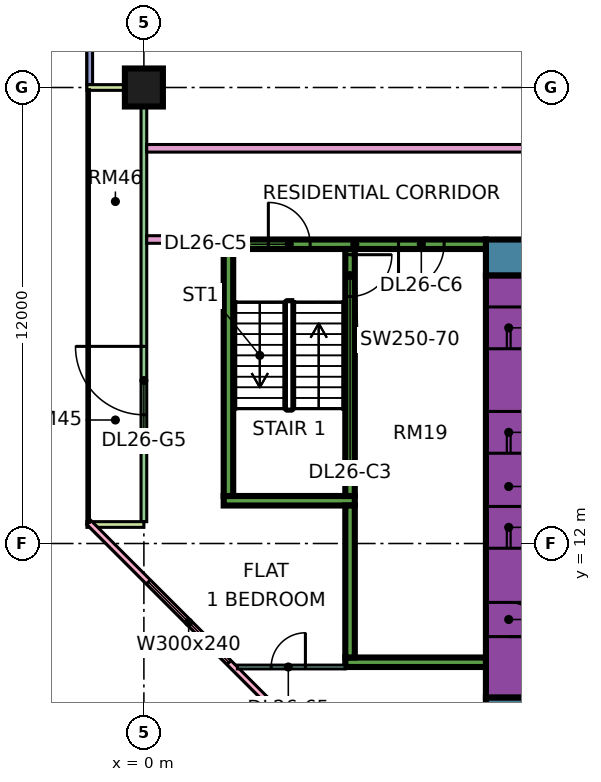
"""IFC4 building model, lengths in metres.
Left out: names, types, materials, properties, quantities, classifications, styles, units other than length and angle.
Written with IfcOpenShell. Run it as: python <this file> out.ifc"""

import sys

from ifc_helpers import new_model, si_unit, direction, frame, frame_2d, origin, origin_2d, place, context, subcontext, project, spatial, rectangle, extrude, element, fill, save


model = new_model("IFC4")
c1 = context("Model", 3, precision=1e-05, world=origin(), true_north=direction((0.0, 1.0)))
c2 = subcontext(c1, "Body", "Model", "MODEL_VIEW")
j1 = project(units=[si_unit("LENGTHUNIT", "METRE"), si_unit("PLANEANGLEUNIT", "RADIAN")], contexts=[c1])
p1 = place(None, origin())
s1 = spatial("IfcSite", under=j1, at=p1, CompositionType="ELEMENT")
p2 = place(p1, origin())
s2 = spatial("IfcBuilding", under=s1, at=p2, CompositionType="ELEMENT")
p3 = place(p2, frame((0.0, 0.0, 114.4)))
s3 = spatial("IfcBuildingStorey", under=s2, at=p3, CompositionType="ELEMENT", Elevation=114.4)
p4 = place(p3, frame((0.0, 24.0, 0.0), z_axis=(0.0, 0.0, 1.0), x_axis=(1.0, 0.0, 0.0)))
e1 = element("IfcColumn", 1, at=p4, inside=s3, PredefinedType="COLUMN", context=c2, shape_type="SweptSolid", body=[
    extrude(rectangle(XDim=1.0, YDim=1.0, at=origin_2d()), origin(), (0.0, 0.0, 1.0), 3.75),
])
p5 = place(p3, frame((9.0, 7.475, 0.0), z_axis=(0.0, 0.0, 1.0), x_axis=(1.0, 0.0, 0.0)))
e2 = element("IfcWall", 2, at=p5, inside=s3, PredefinedType="SHEAR", context=c2, shape_type="SweptSolid", body=[
    extrude(rectangle(XDim=25.0, YDim=0.95, at=frame_2d((12.5, 0.0))), origin(), (0.0, 0.0, 1.0), 3.75),
])
p6 = place(p3, frame((9.0, 19.525, 0.0), z_axis=(0.0, 0.0, 1.0), x_axis=(1.0, 0.0, 0.0)))
e3 = element("IfcWall", 3, at=p6, inside=s3, PredefinedType="SHEAR", context=c2, shape_type="SweptSolid", body=[
    extrude(rectangle(XDim=25.0, YDim=0.95, at=frame_2d((12.5, 0.0))), origin(), (0.0, 0.0, 1.0), 3.75),
])
p7 = place(p6, frame((19.1, 0.0, 0.0)))
e4 = element("IfcOpeningElement", 4, at=p7, cuts=e3, PredefinedType="OPENING", context=c2, shape_type="SweptSolid", body=[
    extrude(rectangle(XDim=1.8, YDim=2.4, at=frame_2d((0.9, 1.2))), frame((0.0, 0.485, 0.0), z_axis=(0.0, -1.0, 0.0), x_axis=(1.0, 0.0, 0.0)), (0.0, 0.0, 1.0), 0.97),
])
p8 = place(p3, frame((9.6, 7.95, 0.0), z_axis=(0.0, 0.0, 1.0), x_axis=(0.0, 1.0, 0.0)))
e5 = element("IfcWall", 5, at=p8, inside=s3, PredefinedType="SHEAR", context=c2, shape_type="SweptSolid", body=[
    extrude(rectangle(XDim=11.1, YDim=1.2, at=frame_2d((5.55, 0.0))), origin(), (0.0, 0.0, 1.0), 3.75),
])
p9 = place(p8, frame((3.925, 0.0, 0.0)))
e6 = element("IfcOpeningElement", 6, at=p9, cuts=e5, PredefinedType="OPENING", context=c2, shape_type="SweptSolid", body=[
    extrude(rectangle(XDim=1.1, YDim=2.2, at=frame_2d((0.55, 1.1))), frame((0.0, 0.61, 0.0), z_axis=(0.0, -1.0, 0.0), x_axis=(1.0, 0.0, 0.0)), (0.0, 0.0, 1.0), 1.22),
])
p10 = place(p8, frame((6.425, 0.0, 0.0)))
e7 = element("IfcOpeningElement", 7, at=p10, cuts=e5, PredefinedType="OPENING", context=c2, shape_type="SweptSolid", body=[
    extrude(rectangle(XDim=1.1, YDim=2.2, at=frame_2d((0.55, 1.1))), frame((0.0, 0.61, 0.0), z_axis=(0.0, -1.0, 0.0), x_axis=(1.0, 0.0, 0.0)), (0.0, 0.0, 1.0), 1.22),
])
p11 = place(p8, frame((9.175, 0.0, 0.0)))
e8 = element("IfcOpeningElement", 8, at=p11, cuts=e5, PredefinedType="OPENING", context=c2, shape_type="SweptSolid", body=[
    extrude(rectangle(XDim=1.1, YDim=2.2, at=frame_2d((0.55, 1.1))), frame((0.0, 0.61, 0.0), z_axis=(0.0, -1.0, 0.0), x_axis=(1.0, 0.0, 0.0)), (0.0, 0.0, 1.0), 1.22),
])
p12 = place(p8, frame((1.6, 0.0, 0.0)))
e9 = element("IfcOpeningElement", 9, at=p12, cuts=e5, PredefinedType="OPENING", context=c2, shape_type="SweptSolid", body=[
    extrude(rectangle(XDim=0.9, YDim=2.1, at=frame_2d((0.45, 1.05))), frame((0.0, 0.61, 0.0), z_axis=(0.0, -1.0, 0.0), x_axis=(1.0, 0.0, 0.0)), (0.0, 0.0, 1.0), 1.22),
])
p13 = place(p3, frame((2.1, 19.875, 0.0), z_axis=(0.0, 0.0, 1.0), x_axis=(1.0, 0.0, 0.0)))
e10 = element("IfcWall", 10, at=p13, inside=s3, PredefinedType="SHEAR", context=c2, shape_type="SweptSolid", body=[
    extrude(rectangle(XDim=6.9, YDim=0.25, at=frame_2d((3.45, 0.0))), origin(), (0.0, 0.0, 1.0), 3.75),
])
p14 = place(p13, frame((1.175, 0.0, 0.0)))
e11 = element("IfcOpeningElement", 11, at=p14, cuts=e10, PredefinedType="OPENING", context=c2, shape_type="SweptSolid", body=[
    extrude(rectangle(XDim=1.1, YDim=2.2, at=frame_2d((0.55, 1.1))), frame((0.0, 0.135, 0.0), z_axis=(0.0, -1.0, 0.0), x_axis=(1.0, 0.0, 0.0)), (0.0, 0.0, 1.0), 0.27),
])
p15 = place(p13, frame((4.6, 0.0, 0.0)))
e12 = element("IfcOpeningElement", 12, at=p15, cuts=e10, PredefinedType="OPENING", context=c2, shape_type="SweptSolid", body=[
    extrude(rectangle(XDim=1.2, YDim=2.2, at=frame_2d((0.6, 1.1))), frame((0.0, 0.135, 0.0), z_axis=(0.0, -1.0, 0.0), x_axis=(1.0, 0.0, 0.0)), (0.0, 0.0, 1.0), 0.27),
])
p16 = place(p3, frame((2.1, 13.125, 0.0), z_axis=(0.0, 0.0, 1.0), x_axis=(1.0, 0.0, 0.0)))
e13 = element("IfcWall", 13, at=p16, inside=s3, PredefinedType="SHEAR", context=c2, shape_type="SweptSolid", body=[
    extrude(rectangle(XDim=3.45, YDim=0.25, at=frame_2d((1.725, 0.0))), origin(), (0.0, 0.0, 1.0), 3.75),
])
p17 = place(p3, frame((2.225, 13.25, 0.0), z_axis=(0.0, 0.0, 1.0), x_axis=(0.0, 1.0, 0.0)))
e14 = element("IfcWall", 14, at=p17, inside=s3, PredefinedType="SHEAR", context=c2, shape_type="SweptSolid", body=[
    extrude(rectangle(XDim=6.5, YDim=0.25, at=frame_2d((3.25, 0.0))), origin(), (0.0, 0.0, 1.0), 3.75),
])
p18 = place(p3, frame((5.425, 13.25, 0.0), z_axis=(0.0, 0.0, 1.0), x_axis=(0.0, 1.0, 0.0)))
e15 = element("IfcWall", 15, at=p18, inside=s3, PredefinedType="SHEAR", context=c2, shape_type="SweptSolid", body=[
    extrude(rectangle(XDim=6.5, YDim=0.25, at=frame_2d((3.25, 0.0))), origin(), (0.0, 0.0, 1.0), 3.75),
])
p19 = place(p18, frame((5.25, 0.0, 0.0)))
e16 = element("IfcOpeningElement", 16, at=p19, cuts=e15, PredefinedType="OPENING", context=c2, shape_type="SweptSolid", body=[
    extrude(rectangle(XDim=1.1, YDim=2.2, at=frame_2d((0.55, 1.1))), frame((0.0, 0.135, 0.0), z_axis=(0.0, -1.0, 0.0), x_axis=(1.0, 0.0, 0.0)), (0.0, 0.0, 1.0), 0.27),
])
p20 = place(p3, frame((5.3, 8.875, 0.0), z_axis=(0.0, 0.0, 1.0), x_axis=(1.0, 0.0, 0.0)))
e17 = element("IfcWall", 17, at=p20, inside=s3, PredefinedType="SHEAR", context=c2, shape_type="SweptSolid", body=[
    extrude(rectangle(XDim=3.7, YDim=0.25, at=frame_2d((1.85, 0.0))), origin(), (0.0, 0.0, 1.0), 3.75),
])
p21 = place(p3, frame((5.425, 9.0, 0.0), z_axis=(0.0, 0.0, 1.0), x_axis=(0.0, 1.0, 0.0)))
e18 = element("IfcWall", 18, at=p21, inside=s3, PredefinedType="SHEAR", context=c2, shape_type="SweptSolid", body=[
    extrude(rectangle(XDim=4.0, YDim=0.25, at=frame_2d((2.0, 0.0))), origin(), (0.0, 0.0, 1.0), 3.75),
])
p22 = place(p3, frame((-1.425, 35.925, 0.0), z_axis=(0.0, 0.0, 1.0), x_axis=(0.0, -1.0, 0.0)))
e19 = element("IfcWall", 19, at=p22, inside=s3, PredefinedType="SOLIDWALL", context=c2, shape_type="SweptSolid", body=[
    extrude(rectangle(XDim=11.85, YDim=0.15, at=frame_2d((5.925, 0.0))), origin(), (0.0, 0.0, 1.0), 3.35),
])
p23 = place(p22, frame((0.562, 0.0, 0.45)))
e20 = element("IfcOpeningElement", 20, at=p23, cuts=e19, PredefinedType="OPENING", context=c2, shape_type="SweptSolid", body=[
    extrude(rectangle(XDim=1.8, YDim=2.4, at=frame_2d((0.9, 1.2))), frame((0.0, 0.085, 0.0), z_axis=(0.0, -1.0, 0.0), x_axis=(1.0, 0.0, 0.0)), (0.0, 0.0, 1.0), 0.17),
])
p24 = place(p22, frame((3.525, 0.0, 0.45)))
e21 = element("IfcOpeningElement", 21, at=p24, cuts=e19, PredefinedType="OPENING", context=c2, shape_type="SweptSolid", body=[
    extrude(rectangle(XDim=1.8, YDim=2.4, at=frame_2d((0.9, 1.2))), frame((0.0, 0.085, 0.0), z_axis=(0.0, -1.0, 0.0), x_axis=(1.0, 0.0, 0.0)), (0.0, 0.0, 1.0), 0.17),
])
p25 = place(p22, frame((7.387, 0.0, 0.45)))
e22 = element("IfcOpeningElement", 22, at=p25, cuts=e19, PredefinedType="OPENING", context=c2, shape_type="SweptSolid", body=[
    extrude(rectangle(XDim=3.0, YDim=2.4, at=frame_2d((1.5, 1.2))), frame((0.0, 0.085, 0.0), z_axis=(0.0, -1.0, 0.0), x_axis=(1.0, 0.0, 0.0)), (0.0, 0.0, 1.0), 0.17),
])
p26 = place(p3, frame((0.0, 23.925, 0.0), z_axis=(0.0, 0.0, 1.0), x_axis=(0.0, -1.0, 0.0)))
e23 = element("IfcWall", 23, at=p26, inside=s3, PredefinedType="SOLIDWALL", context=c2, shape_type="SweptSolid", body=[
    extrude(rectangle(XDim=11.35, YDim=0.15, at=frame_2d((5.675, 0.0))), origin(), (0.0, 0.0, 1.0), 3.35),
])
p27 = place(p26, frame((6.738, 0.0, 0.0)))
e24 = element("IfcOpeningElement", 24, at=p27, cuts=e23, PredefinedType="OPENING", context=c2, shape_type="SweptSolid", body=[
    extrude(rectangle(XDim=1.8, YDim=2.4, at=frame_2d((0.9, 1.2))), frame((0.0, 0.085, 0.0), z_axis=(0.0, -1.0, 0.0), x_axis=(1.0, 0.0, 0.0)), (0.0, 0.0, 1.0), 0.17),
])
for number, where, z_axis, x_axis in (
    (25, (-1.5, 24.0, 0.0), (0.0, 0.0, 1.0), (1.0, 0.0, 0.0)),
    (26, (-1.5, 12.5, 0.0), (0.0, 0.0, 1.0), (1.0, 0.0, 0.0)),
):
    element("IfcWall", number, at=place(p3, frame(where, z_axis=z_axis, x_axis=x_axis)), inside=s3, PredefinedType="SOLIDWALL", context=c2, shape_type="SweptSolid", body=[
        extrude(rectangle(XDim=1.5, YDim=0.15, at=frame_2d((0.75, 0.0))), origin(), (0.0, 0.0, 1.0), 3.35),
    ])
p28 = place(p3, frame((-1.447, 12.553, 0.0), z_axis=(0.0, 0.0, 1.0), x_axis=(0.707106781187, -0.707106781187, 0.0)))
e27 = element("IfcWall", 27, at=p28, inside=s3, PredefinedType="SOLIDWALL", context=c2, shape_type="SweptSolid", body=[
    extrude(rectangle(XDim=19.799, YDim=0.15, at=frame_2d((9.899, 0.0))), origin(), (0.0, 0.0, 1.0), 3.35),
])
p29 = place(p28, frame((2.212, 0.0, 0.45)))
e28 = element("IfcOpeningElement", 28, at=p29, cuts=e27, PredefinedType="OPENING", context=c2, shape_type="SweptSolid", body=[
    extrude(rectangle(XDim=3.0, YDim=2.4, at=frame_2d((1.5, 1.2))), frame((0.0, 0.085, 0.0), z_axis=(0.0, -1.0, 0.0), x_axis=(1.0, 0.0, 0.0)), (0.0, 0.0, 1.0), 0.17),
])
p30 = place(p28, frame((10.216, 0.0, 0.45)))
e29 = element("IfcOpeningElement", 29, at=p30, cuts=e27, PredefinedType="OPENING", context=c2, shape_type="SweptSolid", body=[
    extrude(rectangle(XDim=3.0, YDim=2.4, at=frame_2d((1.5, 1.2))), frame((0.0, 0.085, 0.0), z_axis=(0.0, -1.0, 0.0), x_axis=(1.0, 0.0, 0.0)), (0.0, 0.0, 1.0), 0.17),
])
p31 = place(p3, frame((0.074, 20.0, 0.0), z_axis=(0.0, 0.0, 1.0), x_axis=(1.0, 0.0, 0.0)))
e30 = element("IfcWall", 30, at=p31, inside=s3, PredefinedType="PARTITIONING", context=c2, shape_type="SweptSolid", body=[
    extrude(rectangle(XDim=2.026, YDim=0.2, at=frame_2d((1.013, 0.0))), origin(), (0.0, 0.0, 1.0), 3.35),
])
p32 = place(p3, frame((0.074, 22.4, 0.0), z_axis=(0.0, 0.0, 1.0), x_axis=(1.0, 0.0, 0.0)))
e31 = element("IfcWall", 31, at=p32, inside=s3, PredefinedType="PARTITIONING", context=c2, shape_type="SweptSolid", body=[
    extrude(rectangle(XDim=12.326, YDim=0.2, at=frame_2d((6.163, 0.0))), origin(), (0.0, 0.0, 1.0), 3.35),
])
p33 = place(p3, frame((2.461, 8.75, 0.0), z_axis=(0.0, 0.0, 1.0), x_axis=(1.0, 0.0, 0.0)))
e32 = element("IfcWall", 32, at=p33, inside=s3, PredefinedType="PARTITIONING", context=c2, shape_type="SweptSolid", body=[
    extrude(rectangle(XDim=2.839, YDim=0.1, at=frame_2d((1.419, 0.0))), origin(), (0.0, 0.0, 1.0), 3.35),
])
p34 = place(p33, frame((0.889, 0.0, 0.0)))
e33 = element("IfcOpeningElement", 33, at=p34, cuts=e32, PredefinedType="OPENING", context=c2, shape_type="SweptSolid", body=[
    extrude(rectangle(XDim=0.9, YDim=2.1, at=frame_2d((0.45, 1.05))), frame((0.0, 0.06, 0.0), z_axis=(0.0, -1.0, 0.0), x_axis=(1.0, 0.0, 0.0)), (0.0, 0.0, 1.0), 0.12),
])
p35 = place(p27, frame((1.8, 0.0, 0.0), z_axis=(0.0, 0.0, 1.0), x_axis=(-1.0, 0.0, 0.0)))
e34 = element("IfcDoor", 34, at=p35, inside=s3, OperationType="DOUBLE_DOOR_SINGLE_SWING", PredefinedType="DOOR", context=c2, shape_type="SweptSolid", body=[
    extrude(rectangle(XDim=1.8, YDim=2.4, at=frame_2d((0.9, 1.2))), frame((0.0, 0.025, 0.0), z_axis=(0.0, -1.0, 0.0), x_axis=(1.0, 0.0, 0.0)), (0.0, 0.0, 1.0), 0.05),
])
fill(e24, e34)
p36 = place(p29, origin())
e35 = element("IfcWindow", 35, at=p36, inside=s3, PartitioningType="SINGLE_PANEL", PredefinedType="WINDOW", context=c2, shape_type="SweptSolid", body=[
    extrude(rectangle(XDim=3.0, YDim=2.4, at=frame_2d((1.5, 1.2))), frame((0.0, 0.03, 0.0), z_axis=(0.0, -1.0, 0.0), x_axis=(1.0, 0.0, 0.0)), (0.0, 0.0, 1.0), 0.06),
])
fill(e28, e35)
p37 = place(p9, origin())
e36 = element("IfcDoor", 36, at=p37, inside=s3, OperationType="DOUBLE_DOOR_SLIDING", PredefinedType="DOOR", context=c2, shape_type="SweptSolid", body=[
    extrude(rectangle(XDim=1.1, YDim=2.2, at=frame_2d((0.55, 1.1))), frame((0.0, 0.025, 0.0), z_axis=(0.0, -1.0, 0.0), x_axis=(1.0, 0.0, 0.0)), (0.0, 0.0, 1.0), 0.05),
])
fill(e6, e36)
p38 = place(p10, origin())
e37 = element("IfcDoor", 37, at=p38, inside=s3, OperationType="DOUBLE_DOOR_SLIDING", PredefinedType="DOOR", context=c2, shape_type="SweptSolid", body=[
    extrude(rectangle(XDim=1.1, YDim=2.2, at=frame_2d((0.55, 1.1))), frame((0.0, 0.025, 0.0), z_axis=(0.0, -1.0, 0.0), x_axis=(1.0, 0.0, 0.0)), (0.0, 0.0, 1.0), 0.05),
])
fill(e7, e37)
p39 = place(p11, origin())
e38 = element("IfcDoor", 38, at=p39, inside=s3, OperationType="DOUBLE_DOOR_SLIDING", PredefinedType="DOOR", context=c2, shape_type="SweptSolid", body=[
    extrude(rectangle(XDim=1.1, YDim=2.2, at=frame_2d((0.55, 1.1))), frame((0.0, 0.025, 0.0), z_axis=(0.0, -1.0, 0.0), x_axis=(1.0, 0.0, 0.0)), (0.0, 0.0, 1.0), 0.05),
])
fill(e8, e38)
p40 = place(p19, origin())
e39 = element("IfcDoor", 39, at=p40, inside=s3, OperationType="SINGLE_SWING_RIGHT", PredefinedType="DOOR", context=c2, shape_type="SweptSolid", body=[
    extrude(rectangle(XDim=1.1, YDim=2.2, at=frame_2d((0.55, 1.1))), frame((0.0, 0.025, 0.0), z_axis=(0.0, -1.0, 0.0), x_axis=(1.0, 0.0, 0.0)), (0.0, 0.0, 1.0), 0.05),
])
fill(e16, e39)
p41 = place(p12, frame((0.9, 0.0, 0.0), z_axis=(0.0, 0.0, 1.0), x_axis=(-1.0, 0.0, 0.0)))
e40 = element("IfcDoor", 40, at=p41, inside=s3, OperationType="SINGLE_SWING_LEFT", PredefinedType="DOOR", context=c2, shape_type="SweptSolid", body=[
    extrude(rectangle(XDim=0.9, YDim=2.1, at=frame_2d((0.45, 1.05))), frame((0.0, 0.025, 0.0), z_axis=(0.0, -1.0, 0.0), x_axis=(1.0, 0.0, 0.0)), (0.0, 0.0, 1.0), 0.05),
])
fill(e9, e40)
p42 = place(p14, origin())
e41 = element("IfcDoor", 41, at=p42, inside=s3, OperationType="SINGLE_SWING_LEFT", PredefinedType="DOOR", context=c2, shape_type="SweptSolid", body=[
    extrude(rectangle(XDim=1.1, YDim=2.2, at=frame_2d((0.55, 1.1))), frame((0.0, 0.025, 0.0), z_axis=(0.0, -1.0, 0.0), x_axis=(1.0, 0.0, 0.0)), (0.0, 0.0, 1.0), 0.05),
])
fill(e11, e41)
p43 = place(p15, frame((1.2, 0.0, 0.0), z_axis=(0.0, 0.0, 1.0), x_axis=(-1.0, 0.0, 0.0)))
e42 = element("IfcDoor", 42, at=p43, inside=s3, OperationType="SINGLE_SWING_LEFT", PredefinedType="DOOR", context=c2, shape_type="SweptSolid", body=[
    extrude(rectangle(XDim=1.2, YDim=2.2, at=frame_2d((0.6, 1.1))), frame((0.0, 0.025, 0.0), z_axis=(0.0, -1.0, 0.0), x_axis=(1.0, 0.0, 0.0)), (0.0, 0.0, 1.0), 0.05),
])
fill(e12, e42)
p44 = place(p34, frame((0.9, 0.0, 0.0), z_axis=(0.0, 0.0, 1.0), x_axis=(-1.0, 0.0, 0.0)))
e43 = element("IfcDoor", 43, at=p44, inside=s3, OperationType="SINGLE_SWING_RIGHT", PredefinedType="DOOR", context=c2, shape_type="SweptSolid", body=[
    extrude(rectangle(XDim=0.9, YDim=2.1, at=frame_2d((0.45, 1.05))), frame((0.0, 0.025, 0.0), z_axis=(0.0, -1.0, 0.0), x_axis=(1.0, 0.0, 0.0)), (0.0, 0.0, 1.0), 0.05),
])
fill(e33, e43)
save(model, sys.argv[1])
